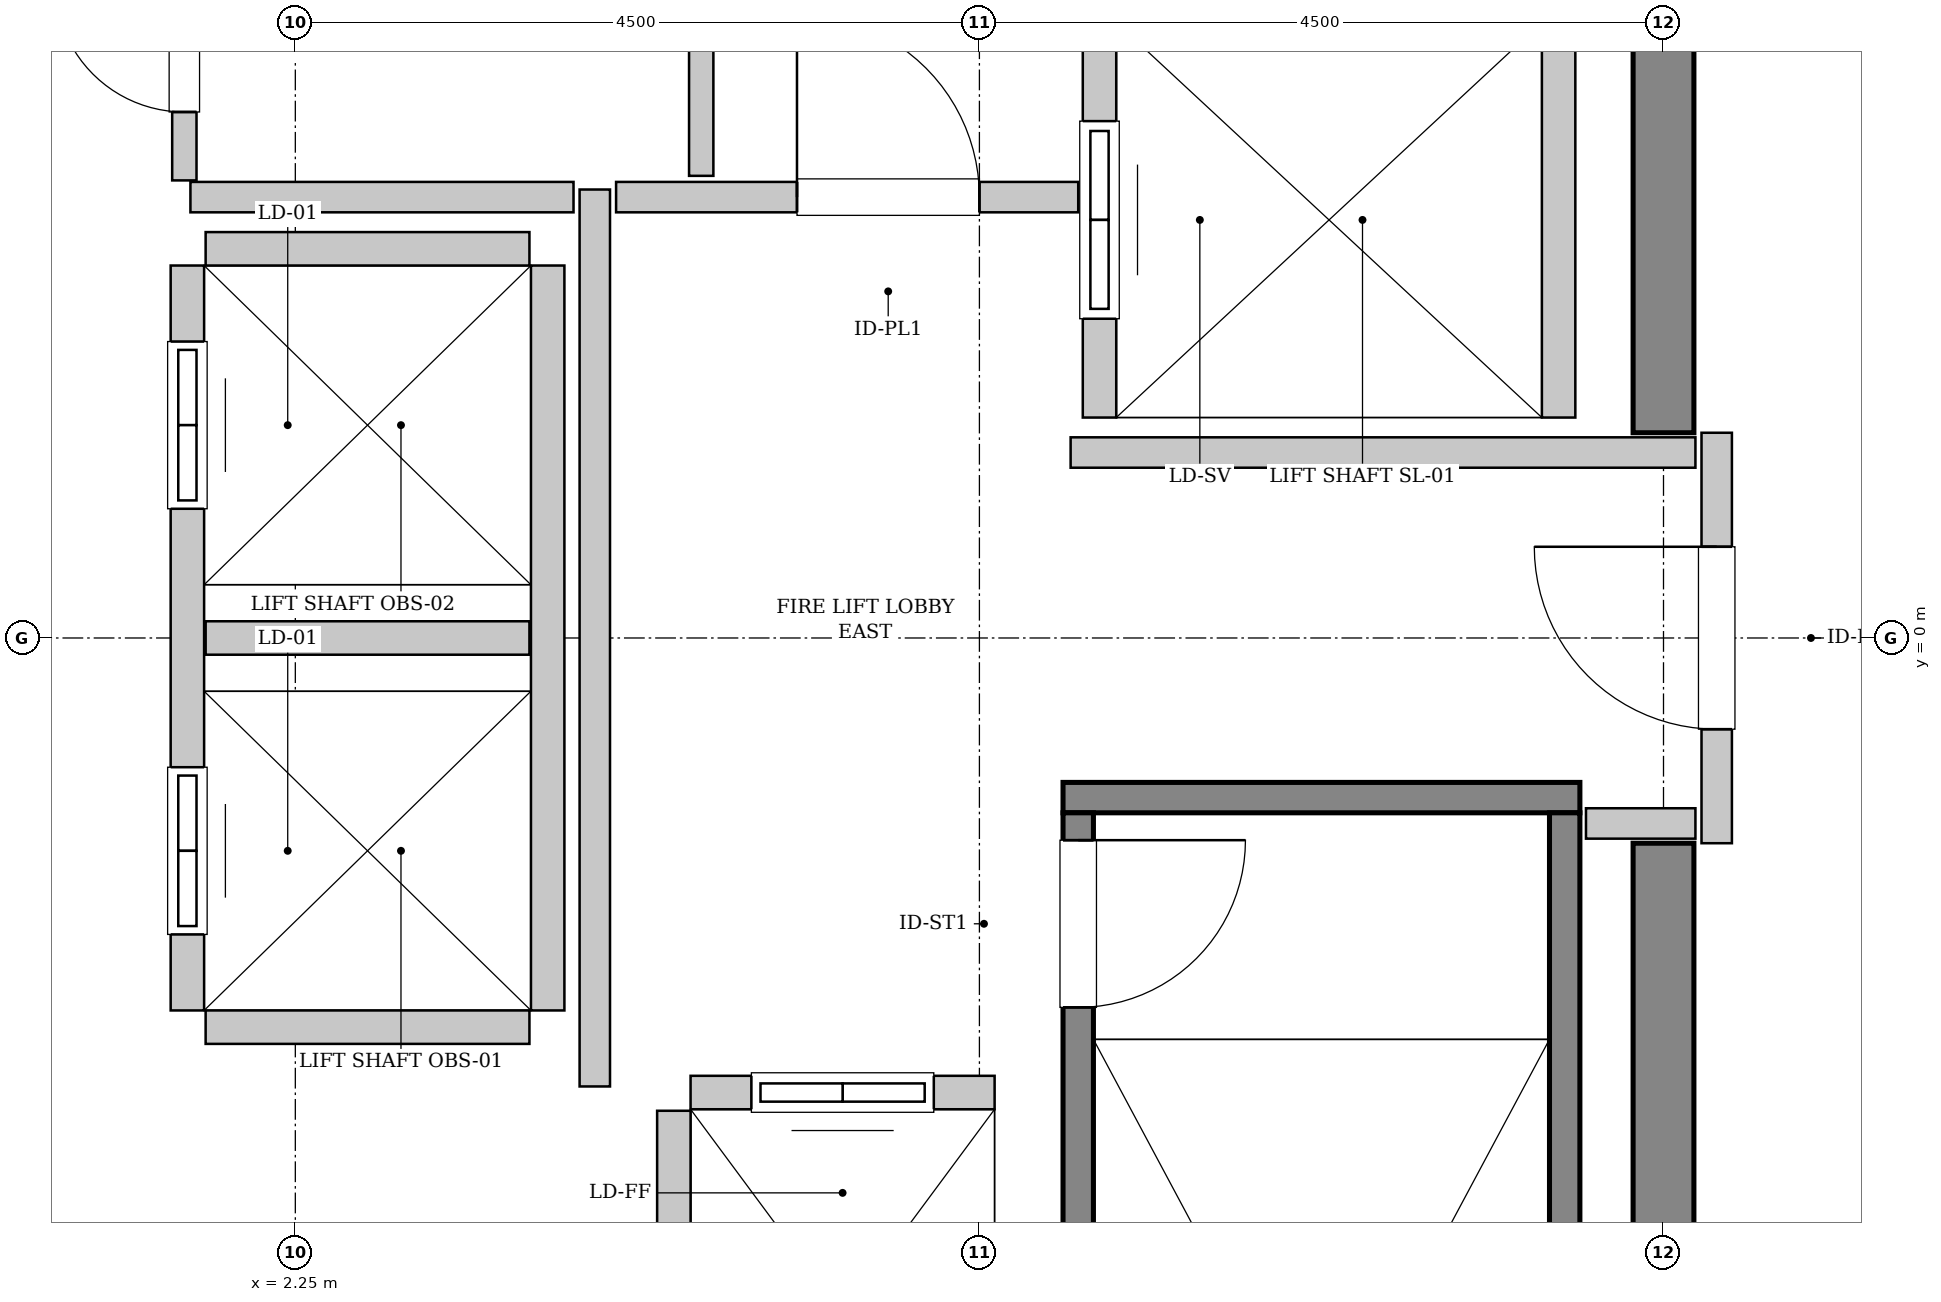
"""IFC4 building model, lengths in metres.
Left out: names, types, materials, properties, quantities, classifications, styles, units other than length and angle.
Written with IfcOpenShell. Run it as: python <this file> out.ifc"""

import sys

from ifc_helpers import new_model, si_unit, direction, frame, frame_2d, origin, place, context, subcontext, project, spatial, rectangle, extrude, source, transform, mapped, element, fill, save


model = new_model("IFC4")
c1 = context("Model", 3, precision=1e-05, world=origin(), true_north=direction((0.0, 1.0)))
c2 = subcontext(c1, "Body", "Model", "MODEL_VIEW")
j1 = project(units=[si_unit("LENGTHUNIT", "METRE"), si_unit("PLANEANGLEUNIT", "RADIAN")], contexts=[c1])
p1 = place(None, origin())
s1 = spatial("IfcSite", under=j1, at=p1, CompositionType="ELEMENT")
p2 = place(p1, origin())
s2 = spatial("IfcBuilding", under=s1, at=p2, CompositionType="ELEMENT")
p3 = place(p2, frame((0.0, 0.0, 349.0)))
s3 = spatial("IfcBuildingStorey", under=s2, at=p3, CompositionType="ELEMENT", Elevation=349.0)
m1 = source(origin(), c2, "Body", "SweptSolid", [
    extrude(rectangle(XDim=7.45, YDim=0.4, at=frame_2d((3.725, 0.0))), origin(), (0.0, 0.0, 1.0), 4.8),
])
for number, where, z_axis, x_axis in (
    (1, (11.25, -8.8, 0.0), (0.0, 0.0, 1.0), (0.0, 1.0, 0.0)),
    (2, (11.25, 1.35, 0.0), (0.0, 0.0, 1.0), (0.0, 1.0, 0.0)),
):
    element("IfcWall", number, at=place(p3, frame(where, z_axis=z_axis, x_axis=x_axis)), inside=s3, PredefinedType="SHEAR", context=c2, shape_type="MappedRepresentation", body=[
        mapped(m1, transform((0.0, 0.0, 0.0), x_axis=(1.0, 0.0, 0.0), y_axis=(0.0, 1.0, 0.0), z_axis=(0.0, 0.0, 1.0), scale=1.0)),
    ])
m2 = source(origin(), c2, "Body", "SweptSolid", [
    extrude(rectangle(XDim=3.4, YDim=0.2, at=frame_2d((1.7, 0.0))), origin(), (0.0, 0.0, 1.0), 4.8),
])
p4 = place(p3, frame((7.3, -1.05, 0.0), z_axis=(0.0, 0.0, 1.0), x_axis=(1.0, 0.0, 0.0)))
e3 = element("IfcWall", 3, at=p4, inside=s3, PredefinedType="SOLIDWALL", context=c2, shape_type="MappedRepresentation", body=[
    mapped(m2, transform((0.0, 0.0, 0.0), x_axis=(1.0, 0.0, 0.0), y_axis=(0.0, 1.0, 0.0), z_axis=(0.0, 0.0, 1.0), scale=1.0)),
])
m3 = source(origin(), c2, "Body", "SweptSolid", [
    extrude(rectangle(XDim=7.1, YDim=0.2, at=frame_2d((3.55, 0.0))), origin(), (0.0, 0.0, 1.0), 4.8),
])
p5 = place(p3, frame((7.4, -1.15, 0.0), z_axis=(0.0, 0.0, 1.0), x_axis=(0.0, -1.0, 0.0)))
e4 = element("IfcWall", 4, at=p5, inside=s3, PredefinedType="SOLIDWALL", context=c2, shape_type="MappedRepresentation", body=[
    mapped(m3, transform((0.0, 0.0, 0.0), x_axis=(1.0, 0.0, 0.0), y_axis=(0.0, 1.0, 0.0), z_axis=(0.0, 0.0, 1.0), scale=1.0)),
])
p6 = place(p5, frame((0.18, 0.0, 0.0)))
e5 = element("IfcOpeningElement", 5, at=p6, cuts=e4, PredefinedType="OPENING", context=c2, shape_type="SweptSolid", body=[
    extrude(rectangle(XDim=1.1, YDim=2.15, at=frame_2d((0.55, 1.075))), frame((0.0, 0.11, 0.0), z_axis=(0.0, -1.0, 0.0), x_axis=(1.0, 0.0, 0.0)), (0.0, 0.0, 1.0), 0.22),
])
p7 = place(p3, frame((10.6, -1.15, 0.0), z_axis=(0.0, 0.0, 1.0), x_axis=(0.0, -1.0, 0.0)))
e6 = element("IfcWall", 6, at=p7, inside=s3, PredefinedType="SOLIDWALL", context=c2, shape_type="MappedRepresentation", body=[
    mapped(m3, transform((0.0, 0.0, 0.0), x_axis=(1.0, 0.0, 0.0), y_axis=(0.0, 1.0, 0.0), z_axis=(0.0, 0.0, 1.0), scale=1.0)),
])
m4 = source(origin(), c2, "Body", "SweptSolid", [
    extrude(rectangle(XDim=2.0, YDim=0.22, at=frame_2d((1.0, 0.0))), origin(), (0.0, 0.0, 1.0), 4.485),
])
p8 = place(p3, frame((6.85, -2.99, 0.0), z_axis=(0.0, 0.0, 1.0), x_axis=(-1.0, 0.0, 0.0)))
e7 = element("IfcWall", 7, at=p8, inside=s3, PredefinedType="SOLIDWALL", context=c2, shape_type="MappedRepresentation", body=[
    mapped(m4, transform((0.0, 0.0, 0.0), x_axis=(1.0, 0.0, 0.0), y_axis=(0.0, 1.0, 0.0), z_axis=(0.0, 0.0, 1.0), scale=1.0)),
])
p9 = place(p8, frame((0.4, 0.0, 0.0)))
e8 = element("IfcOpeningElement", 8, at=p9, cuts=e7, PredefinedType="OPENING", context=c2, shape_type="SweptSolid", body=[
    extrude(rectangle(XDim=1.2, YDim=2.2, at=frame_2d((0.6, 1.1))), frame((0.0, 0.12, 0.0), z_axis=(0.0, -1.0, 0.0), x_axis=(1.0, 0.0, 0.0)), (0.0, 0.0, 1.0), 0.24),
])
m5 = source(origin(), c2, "Body", "SweptSolid", [
    extrude(rectangle(XDim=2.68, YDim=0.22, at=frame_2d((1.34, 0.0))), origin(), (0.0, 0.0, 1.0), 4.485),
])
p10 = place(p3, frame((4.74, -3.11, 0.0), z_axis=(0.0, 0.0, 1.0), x_axis=(0.0, -1.0, 0.0)))
e9 = element("IfcWall", 9, at=p10, inside=s3, PredefinedType="SOLIDWALL", context=c2, shape_type="MappedRepresentation", body=[
    mapped(m5, transform((0.0, 0.0, 0.0), x_axis=(1.0, 0.0, 0.0), y_axis=(0.0, 1.0, 0.0), z_axis=(0.0, 0.0, 1.0), scale=1.0)),
])
m6 = source(origin(), c2, "Body", "SweptSolid", [
    extrude(rectangle(XDim=5.45, YDim=0.22, at=frame_2d((2.725, 0.0))), origin(), (0.0, 0.0, 1.0), 4.485),
])
p11 = place(p3, frame((7.54, 6.9, 0.0), z_axis=(0.0, 0.0, 1.0), x_axis=(0.0, -1.0, 0.0)))
e10 = element("IfcWall", 10, at=p11, inside=s3, PredefinedType="SOLIDWALL", context=c2, shape_type="MappedRepresentation", body=[
    mapped(m6, transform((0.0, 0.0, 0.0), x_axis=(1.0, 0.0, 0.0), y_axis=(0.0, 1.0, 0.0), z_axis=(0.0, 0.0, 1.0), scale=1.0)),
])
p12 = place(p11, frame((3.5, 0.0, 0.0)))
e11 = element("IfcOpeningElement", 11, at=p12, cuts=e10, PredefinedType="OPENING", context=c2, shape_type="SweptSolid", body=[
    extrude(rectangle(XDim=1.3, YDim=2.3, at=frame_2d((0.65, 1.15))), frame((0.0, 0.12, 0.0), z_axis=(0.0, -1.0, 0.0), x_axis=(1.0, 0.0, 0.0)), (0.0, 0.0, 1.0), 0.24),
])
p13 = place(p11, frame((0.65, 0.0, 0.0)))
e12 = element("IfcOpeningElement", 12, at=p13, cuts=e10, PredefinedType="OPENING", context=c2, shape_type="SweptSolid", body=[
    extrude(rectangle(XDim=1.3, YDim=2.3, at=frame_2d((0.65, 1.15))), frame((0.0, 0.12, 0.0), z_axis=(0.0, -1.0, 0.0), x_axis=(1.0, 0.0, 0.0)), (0.0, 0.0, 1.0), 0.24),
])
p14 = place(p3, frame((10.56, 1.45, 0.0), z_axis=(0.0, 0.0, 1.0), x_axis=(0.0, 1.0, 0.0)))
e13 = element("IfcWall", 13, at=p14, inside=s3, PredefinedType="SOLIDWALL", context=c2, shape_type="MappedRepresentation", body=[
    mapped(m6, transform((0.0, 0.0, 0.0), x_axis=(1.0, 0.0, 0.0), y_axis=(0.0, 1.0, 0.0), z_axis=(0.0, 0.0, 1.0), scale=1.0)),
])
m7 = source(origin(), c2, "Body", "SweptSolid", [
    extrude(rectangle(XDim=4.9, YDim=0.22, at=frame_2d((2.45, 0.0))), origin(), (0.0, 0.0, 1.0), 4.485),
])
p15 = place(p3, frame((1.54, 2.45, 0.0), z_axis=(0.0, 0.0, 1.0), x_axis=(0.0, -1.0, 0.0)))
e14 = element("IfcWall", 14, at=p15, inside=s3, PredefinedType="SOLIDWALL", context=c2, shape_type="MappedRepresentation", body=[
    mapped(m7, transform((0.0, 0.0, 0.0), x_axis=(1.0, 0.0, 0.0), y_axis=(0.0, 1.0, 0.0), z_axis=(0.0, 0.0, 1.0), scale=1.0)),
])
p16 = place(p15, frame((3.3, 0.0, 0.0)))
e15 = element("IfcOpeningElement", 15, at=p16, cuts=e14, PredefinedType="OPENING", context=c2, shape_type="SweptSolid", body=[
    extrude(rectangle(XDim=1.1, YDim=2.2, at=frame_2d((0.55, 1.1))), frame((0.0, 0.12, 0.0), z_axis=(0.0, -1.0, 0.0), x_axis=(1.0, 0.0, 0.0)), (0.0, 0.0, 1.0), 0.24),
])
p17 = place(p15, frame((0.5, 0.0, 0.0)))
e16 = element("IfcOpeningElement", 16, at=p17, cuts=e14, PredefinedType="OPENING", context=c2, shape_type="SweptSolid", body=[
    extrude(rectangle(XDim=1.1, YDim=2.2, at=frame_2d((0.55, 1.1))), frame((0.0, 0.12, 0.0), z_axis=(0.0, -1.0, 0.0), x_axis=(1.0, 0.0, 0.0)), (0.0, 0.0, 1.0), 0.24),
])
p18 = place(p3, frame((3.91, -2.45, 0.0), z_axis=(0.0, 0.0, 1.0), x_axis=(0.0, 1.0, 0.0)))
e17 = element("IfcWall", 17, at=p18, inside=s3, PredefinedType="SOLIDWALL", context=c2, shape_type="MappedRepresentation", body=[
    mapped(m7, transform((0.0, 0.0, 0.0), x_axis=(1.0, 0.0, 0.0), y_axis=(0.0, 1.0, 0.0), z_axis=(0.0, 0.0, 1.0), scale=1.0)),
])
m8 = source(origin(), c2, "Body", "SweptSolid", [
    extrude(rectangle(XDim=2.13, YDim=0.22, at=frame_2d((1.065, 0.0))), origin(), (0.0, 0.0, 1.0), 4.485),
])
for number, where, z_axis, x_axis in (
    (18, (1.66, -2.56, 0.0), (0.0, 0.0, 1.0), (1.0, 0.0, 0.0)),
    (19, (1.66, 0.0, 0.0), (0.0, 0.0, 1.0), (1.0, 0.0, 0.0)),
    (20, (3.79, 2.56, 0.0), (0.0, 0.0, 1.0), (-1.0, 0.0, 0.0)),
):
    element("IfcWall", number, at=place(p3, frame(where, z_axis=z_axis, x_axis=x_axis)), inside=s3, PredefinedType="SOLIDWALL", context=c2, shape_type="MappedRepresentation", body=[
        mapped(m8, transform((0.0, 0.0, 0.0), x_axis=(1.0, 0.0, 0.0), y_axis=(0.0, 1.0, 0.0), z_axis=(0.0, 0.0, 1.0), scale=1.0)),
    ])
m9 = source(origin(), c2, "Body", "SweptSolid", [
    extrude(rectangle(XDim=2.7, YDim=0.2, at=frame_2d((1.35, 0.0))), origin(), (0.0, 0.0, 1.0), 3.575),
])
p19 = place(p3, frame((11.6, -1.35, 0.0), z_axis=(0.0, 0.0, 1.0), x_axis=(0.0, 1.0, 0.0)))
e21 = element("IfcWall", 21, at=p19, inside=s3, PredefinedType="PARTITIONING", context=c2, shape_type="MappedRepresentation", body=[
    mapped(m9, transform((0.0, 0.0, 0.0), x_axis=(1.0, 0.0, 0.0), y_axis=(0.0, 1.0, 0.0), z_axis=(0.0, 0.0, 1.0), scale=1.0)),
])
p20 = place(p19, frame((0.75, 0.0, 0.0)))
e22 = element("IfcOpeningElement", 22, at=p20, cuts=e21, PredefinedType="OPENING", context=c2, shape_type="SweptSolid", body=[
    extrude(rectangle(XDim=1.2, YDim=2.15, at=frame_2d((0.6, 1.075))), frame((0.0, 0.11, 0.0), z_axis=(0.0, -1.0, 0.0), x_axis=(1.0, 0.0, 0.0)), (0.0, 0.0, 1.0), 0.22),
])
m10 = source(origin(), c2, "Body", "SweptSolid", [
    extrude(rectangle(XDim=5.9, YDim=0.2, at=frame_2d((2.95, 0.0))), origin(), (0.0, 0.0, 1.0), 4.485),
])
p21 = place(p3, frame((4.22, -2.95, 0.0), z_axis=(0.0, 0.0, 1.0), x_axis=(0.0, 1.0, 0.0)))
e23 = element("IfcWall", 23, at=p21, inside=s3, PredefinedType="PARTITIONING", context=c2, shape_type="MappedRepresentation", body=[
    mapped(m10, transform((0.0, 0.0, 0.0), x_axis=(1.0, 0.0, 0.0), y_axis=(0.0, 1.0, 0.0), z_axis=(0.0, 0.0, 1.0), scale=1.0)),
])
m11 = source(origin(), c2, "Body", "SweptSolid", [
    extrude(rectangle(XDim=2.52, YDim=0.2, at=frame_2d((1.26, 0.0))), origin(), (0.0, 0.0, 1.0), 4.485),
])
p22 = place(p3, frame((1.56, 2.9, 0.0), z_axis=(0.0, 0.0, 1.0), x_axis=(1.0, 0.0, 0.0)))
e24 = element("IfcWall", 24, at=p22, inside=s3, PredefinedType="PARTITIONING", context=c2, shape_type="MappedRepresentation", body=[
    mapped(m11, transform((0.0, 0.0, 0.0), x_axis=(1.0, 0.0, 0.0), y_axis=(0.0, 1.0, 0.0), z_axis=(0.0, 0.0, 1.0), scale=1.0)),
])
m12 = source(origin(), c2, "Body", "SweptSolid", [
    extrude(rectangle(XDim=3.04, YDim=0.2, at=frame_2d((1.52, 0.0))), origin(), (0.0, 0.0, 1.0), 4.485),
])
p23 = place(p3, frame((4.36, 2.9, 0.0), z_axis=(0.0, 0.0, 1.0), x_axis=(1.0, 0.0, 0.0)))
e25 = element("IfcWall", 25, at=p23, inside=s3, PredefinedType="PARTITIONING", context=c2, shape_type="MappedRepresentation", body=[
    mapped(m12, transform((0.0, 0.0, 0.0), x_axis=(1.0, 0.0, 0.0), y_axis=(0.0, 1.0, 0.0), z_axis=(0.0, 0.0, 1.0), scale=1.0)),
])
p24 = place(p23, frame((1.19, 0.0, 0.0)))
e26 = element("IfcOpeningElement", 26, at=p24, cuts=e25, PredefinedType="OPENING", context=c2, shape_type="SweptSolid", body=[
    extrude(rectangle(XDim=1.2, YDim=2.15, at=frame_2d((0.6, 1.075))), frame((0.0, 0.11, 0.0), z_axis=(0.0, -1.0, 0.0), x_axis=(1.0, 0.0, 0.0)), (0.0, 0.0, 1.0), 0.22),
])
m13 = source(origin(), c2, "Body", "SweptSolid", [
    extrude(rectangle(XDim=4.11, YDim=0.2, at=frame_2d((2.055, 0.0))), origin(), (0.0, 0.0, 1.0), 4.485),
])
p25 = place(p3, frame((7.35, 1.22, 0.0), z_axis=(0.0, 0.0, 1.0), x_axis=(1.0, 0.0, 0.0)))
e27 = element("IfcWall", 27, at=p25, inside=s3, PredefinedType="PARTITIONING", context=c2, shape_type="MappedRepresentation", body=[
    mapped(m13, transform((0.0, 0.0, 0.0), x_axis=(1.0, 0.0, 0.0), y_axis=(0.0, 1.0, 0.0), z_axis=(0.0, 0.0, 1.0), scale=1.0)),
])
m14 = source(origin(), c2, "Body", "SweptSolid", [
    extrude(rectangle(XDim=0.72, YDim=0.2, at=frame_2d((0.36, 0.0))), origin(), (0.0, 0.0, 1.0), 4.485),
])
p26 = place(p3, frame((10.74, -1.22, 0.0), z_axis=(0.0, 0.0, 1.0), x_axis=(1.0, 0.0, 0.0)))
e28 = element("IfcWall", 28, at=p26, inside=s3, PredefinedType="PARTITIONING", context=c2, shape_type="MappedRepresentation", body=[
    mapped(m14, transform((0.0, 0.0, 0.0), x_axis=(1.0, 0.0, 0.0), y_axis=(0.0, 1.0, 0.0), z_axis=(0.0, 0.0, 1.0), scale=1.0)),
])
m15 = source(origin(), c2, "Body", "SweptSolid", [
    extrude(rectangle(XDim=5.45, YDim=0.16, at=frame_2d((2.725, 0.0))), origin(), (0.0, 0.0, 1.0), 4.485),
])
p27 = place(p3, frame((4.92, 3.04, 0.0), z_axis=(0.0, 0.0, 1.0), x_axis=(0.0, 1.0, 0.0)))
e29 = element("IfcWall", 29, at=p27, inside=s3, PredefinedType="PARTITIONING", context=c2, shape_type="MappedRepresentation", body=[
    mapped(m15, transform((0.0, 0.0, 0.0), x_axis=(1.0, 0.0, 0.0), y_axis=(0.0, 1.0, 0.0), z_axis=(0.0, 0.0, 1.0), scale=1.0)),
])
m16 = source(origin(), c2, "Body", "SweptSolid", [
    extrude(rectangle(XDim=1.75, YDim=0.16, at=frame_2d((0.875, 0.0))), origin(), (0.0, 0.0, 1.0), 4.485),
])
p28 = place(p3, frame((1.52, 3.01, 0.0), z_axis=(0.0, 0.0, 1.0), x_axis=(0.0, 1.0, 0.0)))
e30 = element("IfcWall", 30, at=p28, inside=s3, PredefinedType="PARTITIONING", context=c2, shape_type="MappedRepresentation", body=[
    mapped(m16, transform((0.0, 0.0, 0.0), x_axis=(1.0, 0.0, 0.0), y_axis=(0.0, 1.0, 0.0), z_axis=(0.0, 0.0, 1.0), scale=1.0)),
])
p29 = place(p28, frame((0.45, 0.0, 0.0)))
e31 = element("IfcOpeningElement", 31, at=p29, cuts=e30, PredefinedType="OPENING", context=c2, shape_type="SweptSolid", body=[
    extrude(rectangle(XDim=0.85, YDim=2.1, at=frame_2d((0.425, 1.05))), frame((0.0, 0.09, 0.0), z_axis=(0.0, -1.0, 0.0), x_axis=(1.0, 0.0, 0.0)), (0.0, 0.0, 1.0), 0.18),
])
m17 = source(origin(), c2, "Body", "SweptSolid", [
    extrude(rectangle(XDim=1.1, YDim=2.15, at=frame_2d((0.55, 1.075))), frame((0.0, 0.025, 0.0), z_axis=(0.0, -1.0, 0.0), x_axis=(1.0, 0.0, 0.0)), (0.0, 0.0, 1.0), 0.05),
])
p30 = place(p6, origin())
e32 = element("IfcDoor", 32, at=p30, inside=s3, OperationType="SINGLE_SWING_LEFT", PredefinedType="DOOR", context=c2, shape_type="MappedRepresentation", body=[
    mapped(m17, transform((0.0, 0.0, 0.0), x_axis=(1.0, 0.0, 0.0), y_axis=(0.0, 1.0, 0.0), z_axis=(0.0, 0.0, 1.0), scale=1.0)),
])
fill(e5, e32)
m18 = source(origin(), c2, "Body", "SweptSolid", [
    extrude(rectangle(XDim=1.2, YDim=2.2, at=frame_2d((0.6, 1.1))), frame((0.0, 0.025, 0.0), z_axis=(0.0, -1.0, 0.0), x_axis=(1.0, 0.0, 0.0)), (0.0, 0.0, 1.0), 0.05),
])
p31 = place(p9, origin())
e33 = element("IfcDoor", 33, at=p31, inside=s3, OperationType="SLIDING_TO_LEFT", PredefinedType="DOOR", context=c2, shape_type="MappedRepresentation", body=[
    mapped(m18, transform((0.0, 0.0, 0.0), x_axis=(1.0, 0.0, 0.0), y_axis=(0.0, 1.0, 0.0), z_axis=(0.0, 0.0, 1.0), scale=1.0)),
])
fill(e8, e33)
m19 = source(origin(), c2, "Body", "SweptSolid", [
    extrude(rectangle(XDim=1.3, YDim=2.3, at=frame_2d((0.65, 1.15))), frame((0.0, 0.025, 0.0), z_axis=(0.0, -1.0, 0.0), x_axis=(1.0, 0.0, 0.0)), (0.0, 0.0, 1.0), 0.05),
])
p32 = place(p12, origin())
e34 = element("IfcDoor", 34, at=p32, inside=s3, OperationType="SLIDING_TO_RIGHT", PredefinedType="DOOR", context=c2, shape_type="MappedRepresentation", body=[
    mapped(m19, transform((0.0, 0.0, 0.0), x_axis=(1.0, 0.0, 0.0), y_axis=(0.0, 1.0, 0.0), z_axis=(0.0, 0.0, 1.0), scale=1.0)),
])
fill(e11, e34)
m20 = source(origin(), c2, "Body", "SweptSolid", [
    extrude(rectangle(XDim=1.1, YDim=2.2, at=frame_2d((0.55, 1.1))), frame((0.0, 0.025, 0.0), z_axis=(0.0, -1.0, 0.0), x_axis=(1.0, 0.0, 0.0)), (0.0, 0.0, 1.0), 0.05),
])
p33 = place(p16, origin())
e35 = element("IfcDoor", 35, at=p33, inside=s3, OperationType="DOUBLE_DOOR_SLIDING", PredefinedType="DOOR", context=c2, shape_type="MappedRepresentation", body=[
    mapped(m20, transform((0.0, 0.0, 0.0), x_axis=(1.0, 0.0, 0.0), y_axis=(0.0, 1.0, 0.0), z_axis=(0.0, 0.0, 1.0), scale=1.0)),
])
fill(e15, e35)
p34 = place(p17, origin())
e36 = element("IfcDoor", 36, at=p34, inside=s3, OperationType="DOUBLE_DOOR_SLIDING", PredefinedType="DOOR", context=c2, shape_type="MappedRepresentation", body=[
    mapped(m20, transform((0.0, 0.0, 0.0), x_axis=(1.0, 0.0, 0.0), y_axis=(0.0, 1.0, 0.0), z_axis=(0.0, 0.0, 1.0), scale=1.0)),
])
fill(e16, e36)
m21 = source(origin(), c2, "Body", "SweptSolid", [
    extrude(rectangle(XDim=1.2, YDim=2.15, at=frame_2d((0.6, 1.075))), frame((0.0, 0.025, 0.0), z_axis=(0.0, -1.0, 0.0), x_axis=(1.0, 0.0, 0.0)), (0.0, 0.0, 1.0), 0.05),
])
p35 = place(p20, origin())
e37 = element("IfcDoor", 37, at=p35, inside=s3, OperationType="SINGLE_SWING_RIGHT", PredefinedType="DOOR", context=c2, shape_type="MappedRepresentation", body=[
    mapped(m21, transform((0.0, 0.0, 0.0), x_axis=(1.0, 0.0, 0.0), y_axis=(0.0, 1.0, 0.0), z_axis=(0.0, 0.0, 1.0), scale=1.0)),
])
fill(e22, e37)
p36 = place(p24, origin())
e38 = element("IfcDoor", 38, at=p36, inside=s3, OperationType="SINGLE_SWING_LEFT", PredefinedType="DOOR", context=c2, shape_type="MappedRepresentation", body=[
    mapped(m21, transform((0.0, 0.0, 0.0), x_axis=(1.0, 0.0, 0.0), y_axis=(0.0, 1.0, 0.0), z_axis=(0.0, 0.0, 1.0), scale=1.0)),
])
fill(e26, e38)
m22 = source(origin(), c2, "Body", "SweptSolid", [
    extrude(rectangle(XDim=0.85, YDim=2.1, at=frame_2d((0.425, 1.05))), frame((0.0, 0.025, 0.0), z_axis=(0.0, -1.0, 0.0), x_axis=(1.0, 0.0, 0.0)), (0.0, 0.0, 1.0), 0.05),
])
p37 = place(p29, origin())
e39 = element("IfcDoor", 39, at=p37, inside=s3, OperationType="SINGLE_SWING_RIGHT", PredefinedType="DOOR", context=c2, shape_type="MappedRepresentation", body=[
    mapped(m22, transform((0.0, 0.0, 0.0), x_axis=(1.0, 0.0, 0.0), y_axis=(0.0, 1.0, 0.0), z_axis=(0.0, 0.0, 1.0), scale=1.0)),
])
fill(e31, e39)
save(model, sys.argv[1])
